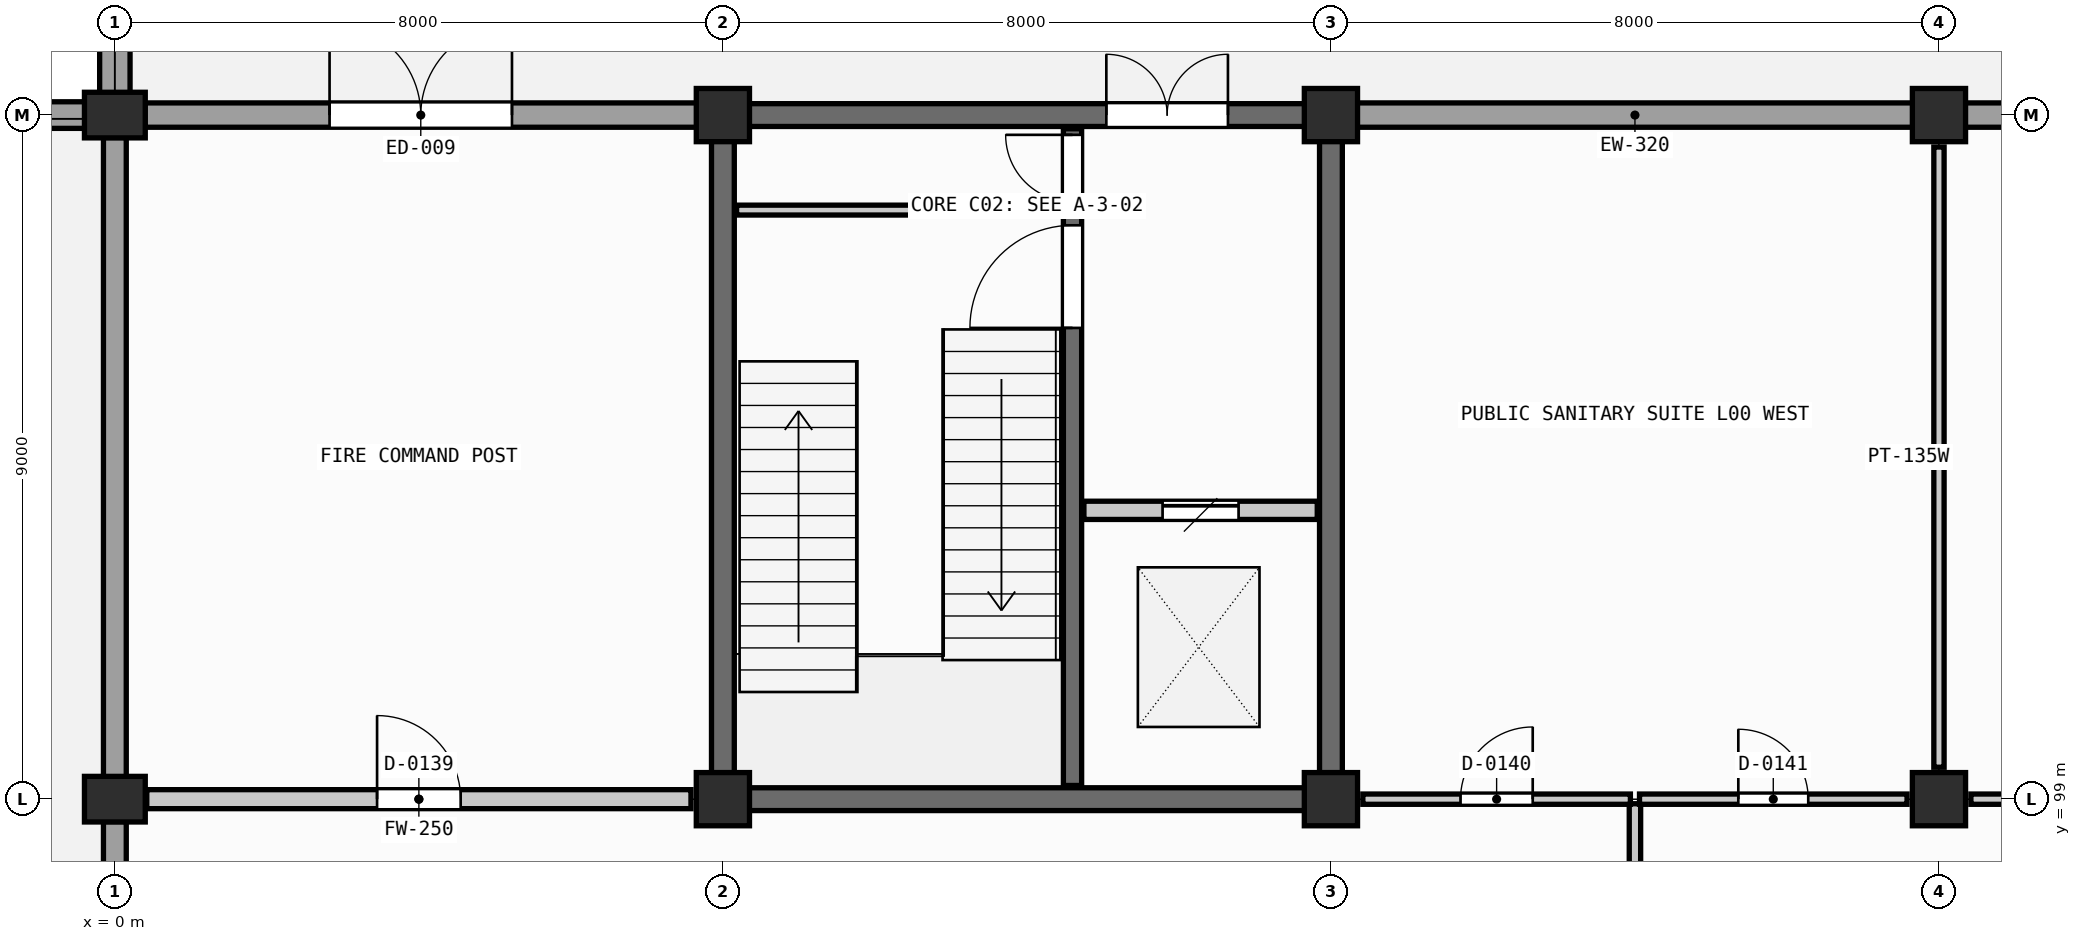
"""IFC4 building model, lengths in metres.
Left out: names, types, materials, properties, quantities, classifications, styles, units other than length and angle.
Written with IfcOpenShell. Run it as: python <this file> out.ifc"""

import sys

from ifc_helpers import new_model, si_unit, direction, frame, frame_2d, origin, origin_2d, place, context, subcontext, project, spatial, rectangle, extrude, element, fill, save


model = new_model("IFC4")
c1 = context("Model", 3, precision=1e-05, world=origin(), true_north=direction((0.0, 1.0)))
c2 = subcontext(c1, "Body", "Model", "MODEL_VIEW")
j1 = project(units=[si_unit("LENGTHUNIT", "METRE"), si_unit("PLANEANGLEUNIT", "RADIAN")], contexts=[c1])
p1 = place(None, origin())
s1 = spatial("IfcSite", under=j1, at=p1, CompositionType="ELEMENT")
p2 = place(p1, origin())
s2 = spatial("IfcBuilding", under=s1, at=p2, CompositionType="ELEMENT")
p3 = place(p2, origin())
s3 = spatial("IfcBuildingStorey", under=s2, at=p3, CompositionType="ELEMENT", Elevation=0.0)
p4 = place(p3, frame((-3.2, 108.0, -1.25), z_axis=(0.0, 0.0, 1.0), x_axis=(1.0, 0.0, 0.0)))
e1 = element("IfcWall", 1, at=p4, inside=s3, PredefinedType="STANDARD", context=c2, shape_type="SweptSolid", body=[
    extrude(rectangle(XDim=3.2, YDim=0.35, at=frame_2d((1.6, 0.0))), origin(), (0.0, 0.0, 1.0), 0.97),
])
p5 = place(p3, frame((0.0, 108.0, -1.25), z_axis=(0.0, 0.0, 1.0), x_axis=(0.0, 1.0, 0.0)))
e2 = element("IfcWall", 2, at=p5, inside=s3, PredefinedType="STANDARD", context=c2, shape_type="SweptSolid", body=[
    extrude(rectangle(XDim=9.0, YDim=0.4, at=frame_2d((4.5, 0.0))), origin(), (0.0, 0.0, 1.0), 0.97),
])
for number, where, z_axis, x_axis in (
    (3, (0.0, 99.0, -1.25), (0.0, 0.0, 1.0), (1.0, 0.0, 0.0)),
    (4, (0.0, 108.0, -1.25), (0.0, 0.0, 1.0), (1.0, 0.0, 0.0)),
):
    element("IfcColumn", number, at=place(p3, frame(where, z_axis=z_axis, x_axis=x_axis)), inside=s3, PredefinedType="COLUMN", context=c2, shape_type="SweptSolid", body=[
        extrude(rectangle(XDim=0.8, YDim=0.6, at=origin_2d()), origin(), (0.0, 0.0, 1.0), 6.05),
    ])
for number, where, z_axis, x_axis in (
    (5, (8.0, 99.0, -1.25), (0.0, 0.0, 1.0), (1.0, 0.0, 0.0)),
    (6, (8.0, 108.0, -1.25), (0.0, 0.0, 1.0), (1.0, 0.0, 0.0)),
    (7, (16.0, 99.0, -1.25), (0.0, 0.0, 1.0), (1.0, 0.0, 0.0)),
    (8, (16.0, 108.0, -1.25), (0.0, 0.0, 1.0), (1.0, 0.0, 0.0)),
    (9, (24.0, 99.0, -1.25), (0.0, 0.0, 1.0), (1.0, 0.0, 0.0)),
    (10, (24.0, 108.0, -1.25), (0.0, 0.0, 1.0), (1.0, 0.0, 0.0)),
):
    element("IfcColumn", number, at=place(p3, frame(where, z_axis=z_axis, x_axis=x_axis)), inside=s3, PredefinedType="COLUMN", context=c2, shape_type="SweptSolid", body=[
        extrude(rectangle(XDim=0.7, YDim=0.7, at=origin_2d()), origin(), (0.0, 0.0, 1.0), 6.05),
    ])
p6 = place(p3, frame((7.655, 108.0, 0.0), z_axis=(0.0, 0.0, 1.0), x_axis=(-1.0, 0.0, 0.0)))
e11 = element("IfcWall", 11, at=p6, inside=s3, PredefinedType="SOLIDWALL", context=c2, shape_type="SweptSolid", body=[
    extrude(rectangle(XDim=7.26, YDim=0.32, at=frame_2d((3.63, 0.0))), origin(), (0.0, 0.0, 1.0), 3.65),
])
p7 = place(p6, frame((2.43, 0.0, 0.0)))
e12 = element("IfcOpeningElement", 12, at=p7, cuts=e11, PredefinedType="OPENING", context=c2, shape_type="SweptSolid", body=[
    extrude(rectangle(XDim=2.4, YDim=2.3, at=frame_2d((1.2, 1.15))), frame((0.0, 0.17, 0.0), z_axis=(0.0, -1.0, 0.0), x_axis=(1.0, 0.0, 0.0)), (0.0, 0.0, 1.0), 0.34),
])
p8 = place(p3, frame((23.655, 108.0, 0.0), z_axis=(0.0, 0.0, 1.0), x_axis=(-1.0, 0.0, 0.0)))
e13 = element("IfcWall", 13, at=p8, inside=s3, PredefinedType="SOLIDWALL", context=c2, shape_type="SweptSolid", body=[
    extrude(rectangle(XDim=7.31, YDim=0.32, at=frame_2d((3.655, 0.0))), origin(), (0.0, 0.0, 1.0), 3.65),
])
p9 = place(p3, frame((31.63, 108.0, 0.0), z_axis=(0.0, 0.0, 1.0), x_axis=(-1.0, 0.0, 0.0)))
e14 = element("IfcWall", 14, at=p9, inside=s3, PredefinedType="SOLIDWALL", context=c2, shape_type="SweptSolid", body=[
    extrude(rectangle(XDim=7.285, YDim=0.32, at=frame_2d((3.643, 0.0))), origin(), (0.0, 0.0, 1.0), 3.65),
])
p10 = place(p3, frame((0.0, 98.705, 0.0), z_axis=(0.0, 0.0, 1.0), x_axis=(0.0, -1.0, 0.0)))
e15 = element("IfcWall", 15, at=p10, inside=s3, PredefinedType="SOLIDWALL", context=c2, shape_type="SweptSolid", body=[
    extrude(rectangle(XDim=8.41, YDim=0.3, at=frame_2d((4.205, 0.0))), origin(), (0.0, 0.0, 1.0), 3.65),
])
p11 = place(p10, frame((3.005, 0.0, 0.0)))
e16 = element("IfcOpeningElement", 16, at=p11, cuts=e15, PredefinedType="OPENING", context=c2, shape_type="SweptSolid", body=[
    extrude(rectangle(XDim=2.4, YDim=2.3, at=frame_2d((1.2, 1.15))), frame((0.0, 0.16, 0.0), z_axis=(0.0, -1.0, 0.0), x_axis=(1.0, 0.0, 0.0)), (0.0, 0.0, 1.0), 0.32),
])
p12 = place(p3, frame((0.0, 107.705, 0.0), z_axis=(0.0, 0.0, 1.0), x_axis=(0.0, -1.0, 0.0)))
e17 = element("IfcWall", 17, at=p12, inside=s3, PredefinedType="SOLIDWALL", context=c2, shape_type="SweptSolid", body=[
    extrude(rectangle(XDim=8.41, YDim=0.3, at=frame_2d((4.205, 0.0))), origin(), (0.0, 0.0, 1.0), 3.65),
])
p13 = place(p3, frame((8.345, 99.0, -1.25), z_axis=(0.0, 0.0, 1.0), x_axis=(1.0, 0.0, 0.0)))
e18 = element("IfcWall", 18, at=p13, inside=s3, PredefinedType="SHEAR", context=c2, shape_type="SweptSolid", body=[
    extrude(rectangle(XDim=7.31, YDim=0.3, at=frame_2d((3.655, 0.0))), origin(), (0.0, 0.0, 1.0), 5.805),
])
p14 = place(p3, frame((8.345, 108.0, -1.25), z_axis=(0.0, 0.0, 1.0), x_axis=(1.0, 0.0, 0.0)))
e19 = element("IfcWall", 19, at=p14, inside=s3, PredefinedType="SHEAR", context=c2, shape_type="SweptSolid", body=[
    extrude(rectangle(XDim=7.31, YDim=0.3, at=frame_2d((3.655, 0.0))), origin(), (0.0, 0.0, 1.0), 5.805),
])
p15 = place(p14, frame((4.7, 0.0, 1.25)))
e20 = element("IfcOpeningElement", 20, at=p15, cuts=e19, PredefinedType="OPENING", context=c2, shape_type="SweptSolid", body=[
    extrude(rectangle(XDim=1.6, YDim=2.2, at=frame_2d((0.8, 1.1))), frame((0.0, 0.16, 0.0), z_axis=(0.0, -1.0, 0.0), x_axis=(1.0, 0.0, 0.0)), (0.0, 0.0, 1.0), 0.32),
])
for number, where, z_axis, x_axis in (
    (21, (8.0, 99.345, -1.25), (0.0, 0.0, 1.0), (0.0, 1.0, 0.0)),
    (22, (16.0, 99.345, -1.25), (0.0, 0.0, 1.0), (0.0, 1.0, 0.0)),
):
    element("IfcWall", number, at=place(p3, frame(where, z_axis=z_axis, x_axis=x_axis)), inside=s3, PredefinedType="SHEAR", context=c2, shape_type="SweptSolid", body=[
        extrude(rectangle(XDim=8.31, YDim=0.3, at=frame_2d((4.155, 0.0))), origin(), (0.0, 0.0, 1.0), 5.805),
    ])
p16 = place(p3, frame((12.6, 99.18, -1.25), z_axis=(0.0, 0.0, 1.0), x_axis=(0.0, 1.0, 0.0)))
e23 = element("IfcWall", 23, at=p16, inside=s3, PredefinedType="SHEAR", context=c2, shape_type="SweptSolid", body=[
    extrude(rectangle(XDim=8.64, YDim=0.24, at=frame_2d((4.32, 0.0))), origin(), (0.0, 0.0, 1.0), 5.805),
])
p17 = place(p16, frame((6.02, 0.0, 1.25)))
e24 = element("IfcOpeningElement", 24, at=p17, cuts=e23, PredefinedType="OPENING", context=c2, shape_type="SweptSolid", body=[
    extrude(rectangle(XDim=1.35, YDim=2.2, at=frame_2d((0.675, 1.1))), frame((0.0, 0.13, 0.0), z_axis=(0.0, -1.0, 0.0), x_axis=(1.0, 0.0, 0.0)), (0.0, 0.0, 1.0), 0.26),
])
p18 = place(p16, frame((7.68, 0.0, 1.25)))
e25 = element("IfcOpeningElement", 25, at=p18, cuts=e23, PredefinedType="OPENING", context=c2, shape_type="SweptSolid", body=[
    extrude(rectangle(XDim=0.88, YDim=2.02, at=frame_2d((0.44, 1.01))), frame((0.0, 0.13, 0.0), z_axis=(0.0, -1.0, 0.0), x_axis=(1.0, 0.0, 0.0)), (0.0, 0.0, 1.0), 0.26),
])
p19 = place(p3, frame((8.18, 106.75, 0.0), z_axis=(0.0, 0.0, 1.0), x_axis=(1.0, 0.0, 0.0)))
e26 = element("IfcWall", 26, at=p19, inside=s3, PredefinedType="PARTITIONING", context=c2, shape_type="SweptSolid", body=[
    extrude(rectangle(XDim=4.28, YDim=0.13, at=frame_2d((2.14, 0.0))), origin(), (0.0, 0.0, 1.0), 3.905),
])
p20 = place(p3, frame((12.75, 102.8, 0.0), z_axis=(0.0, 0.0, 1.0), x_axis=(1.0, 0.0, 0.0)))
e27 = element("IfcWall", 27, at=p20, inside=s3, PredefinedType="SHEAR", context=c2, shape_type="SweptSolid", body=[
    extrude(rectangle(XDim=3.07, YDim=0.24, at=frame_2d((1.535, 0.0))), origin(), (0.0, 0.0, 1.0), 3.905),
])
p21 = place(p20, frame((1.035, 0.0, 0.0)))
e28 = element("IfcOpeningElement", 28, at=p21, cuts=e27, PredefinedType="OPENING", context=c2, shape_type="SweptSolid", body=[
    extrude(rectangle(XDim=1.0, YDim=2.15, at=frame_2d((0.5, 1.075))), frame((0.0, 0.13, 0.0), z_axis=(0.0, -1.0, 0.0), x_axis=(1.0, 0.0, 0.0)), (0.0, 0.0, 1.0), 0.26),
])
p22 = place(p3, frame((20.0, 90.06, 0.0), z_axis=(0.0, 0.0, 1.0), x_axis=(0.0, 1.0, 0.0)))
e29 = element("IfcWall", 29, at=p22, inside=s3, PredefinedType="PARTITIONING", context=c2, shape_type="SweptSolid", body=[
    extrude(rectangle(XDim=8.88, YDim=0.15, at=frame_2d((4.44, 0.0))), origin(), (0.0, 0.0, 1.0), 3.65),
])
p23 = place(p3, frame((0.42, 99.0, 0.0), z_axis=(0.0, 0.0, 1.0), x_axis=(1.0, 0.0, 0.0)))
e30 = element("IfcWall", 30, at=p23, inside=s3, PredefinedType="SOLIDWALL", context=c2, shape_type="SweptSolid", body=[
    extrude(rectangle(XDim=7.16, YDim=0.25, at=frame_2d((3.58, 0.0))), origin(), (0.0, 0.0, 1.0), 3.65),
])
p24 = place(p23, frame((3.03, 0.0, 0.0)))
e31 = element("IfcOpeningElement", 31, at=p24, cuts=e30, PredefinedType="OPENING", context=c2, shape_type="SweptSolid", body=[
    extrude(rectangle(XDim=1.1, YDim=2.22, at=frame_2d((0.55, 1.11))), frame((0.0, 0.135, 0.0), z_axis=(0.0, -1.0, 0.0), x_axis=(1.0, 0.0, 0.0)), (0.0, 0.0, 1.0), 0.27),
])
p25 = place(p3, frame((16.42, 99.0, 0.0), z_axis=(0.0, 0.0, 1.0), x_axis=(1.0, 0.0, 0.0)))
e32 = element("IfcWall", 32, at=p25, inside=s3, PredefinedType="PLUMBINGWALL", context=c2, shape_type="SweptSolid", body=[
    extrude(rectangle(XDim=3.52, YDim=0.135, at=frame_2d((1.76, 0.0))), origin(), (0.0, 0.0, 1.0), 3.65),
])
p26 = place(p25, frame((1.285, 0.0, 0.0)))
e33 = element("IfcOpeningElement", 33, at=p26, cuts=e32, PredefinedType="OPENING", context=c2, shape_type="SweptSolid", body=[
    extrude(rectangle(XDim=0.95, YDim=2.1, at=frame_2d((0.475, 1.05))), frame((0.0, 0.078, 0.0), z_axis=(0.0, -1.0, 0.0), x_axis=(1.0, 0.0, 0.0)), (0.0, 0.0, 1.0), 0.155),
])
p27 = place(p3, frame((20.06, 99.0, 0.0), z_axis=(0.0, 0.0, 1.0), x_axis=(1.0, 0.0, 0.0)))
e34 = element("IfcWall", 34, at=p27, inside=s3, PredefinedType="PLUMBINGWALL", context=c2, shape_type="SweptSolid", body=[
    extrude(rectangle(XDim=3.52, YDim=0.135, at=frame_2d((1.76, 0.0))), origin(), (0.0, 0.0, 1.0), 3.65),
])
p28 = place(p27, frame((1.3, 0.0, 0.0)))
e35 = element("IfcOpeningElement", 35, at=p28, cuts=e34, PredefinedType="OPENING", context=c2, shape_type="SweptSolid", body=[
    extrude(rectangle(XDim=0.92, YDim=2.08, at=frame_2d((0.46, 1.04))), frame((0.0, 0.078, 0.0), z_axis=(0.0, -1.0, 0.0), x_axis=(1.0, 0.0, 0.0)), (0.0, 0.0, 1.0), 0.155),
])
p29 = place(p3, frame((24.42, 99.0, 0.0), z_axis=(0.0, 0.0, 1.0), x_axis=(1.0, 0.0, 0.0)))
e36 = element("IfcWall", 36, at=p29, inside=s3, PredefinedType="PLUMBINGWALL", context=c2, shape_type="SweptSolid", body=[
    extrude(rectangle(XDim=7.16, YDim=0.135, at=frame_2d((3.58, 0.0))), origin(), (0.0, 0.0, 1.0), 3.65),
])
p30 = place(p29, frame((3.04, 0.0, 0.0)))
e37 = element("IfcOpeningElement", 37, at=p30, cuts=e36, PredefinedType="OPENING", context=c2, shape_type="SweptSolid", body=[
    extrude(rectangle(XDim=1.08, YDim=2.12, at=frame_2d((0.54, 1.06))), frame((0.0, 0.078, 0.0), z_axis=(0.0, -1.0, 0.0), x_axis=(1.0, 0.0, 0.0)), (0.0, 0.0, 1.0), 0.155),
])
p31 = place(p3, frame((24.0, 99.42, 0.0), z_axis=(0.0, 0.0, 1.0), x_axis=(0.0, 1.0, 0.0)))
e38 = element("IfcWall", 38, at=p31, inside=s3, PredefinedType="PLUMBINGWALL", context=c2, shape_type="SweptSolid", body=[
    extrude(rectangle(XDim=8.16, YDim=0.135, at=frame_2d((4.08, 0.0))), origin(), (0.0, 0.0, 1.0), 3.65),
])
p32 = place(p7, frame((2.4, 0.0, 0.0), z_axis=(0.0, 0.0, 1.0), x_axis=(-1.0, 0.0, 0.0)))
e39 = element("IfcDoor", 39, at=p32, inside=s3, OperationType="DOUBLE_DOOR_SINGLE_SWING", PredefinedType="DOOR", context=c2, shape_type="SweptSolid", body=[
    extrude(rectangle(XDim=2.4, YDim=2.3, at=frame_2d((1.2, 1.15))), frame((0.0, 0.025, 0.0), z_axis=(0.0, -1.0, 0.0), x_axis=(1.0, 0.0, 0.0)), (0.0, 0.0, 1.0), 0.05),
])
fill(e12, e39)
p33 = place(p17, origin())
e40 = element("IfcDoor", 40, at=p33, inside=s3, OperationType="SINGLE_SWING_LEFT", PredefinedType="DOOR", context=c2, shape_type="SweptSolid", body=[
    extrude(rectangle(XDim=1.35, YDim=2.2, at=frame_2d((0.675, 1.1))), frame((0.0, 0.025, 0.0), z_axis=(0.0, -1.0, 0.0), x_axis=(1.0, 0.0, 0.0)), (0.0, 0.0, 1.0), 0.05),
])
fill(e24, e40)
p34 = place(p18, origin())
e41 = element("IfcDoor", 41, at=p34, inside=s3, OperationType="SINGLE_SWING_RIGHT", PredefinedType="DOOR", context=c2, shape_type="SweptSolid", body=[
    extrude(rectangle(XDim=0.88, YDim=2.02, at=frame_2d((0.44, 1.01))), frame((0.0, 0.025, 0.0), z_axis=(0.0, -1.0, 0.0), x_axis=(1.0, 0.0, 0.0)), (0.0, 0.0, 1.0), 0.05),
])
fill(e25, e41)
p35 = place(p15, origin())
e42 = element("IfcDoor", 42, at=p35, inside=s3, OperationType="DOUBLE_DOOR_SINGLE_SWING", PredefinedType="DOOR", context=c2, shape_type="SweptSolid", body=[
    extrude(rectangle(XDim=1.6, YDim=2.2, at=frame_2d((0.8, 1.1))), frame((0.0, 0.025, 0.0), z_axis=(0.0, -1.0, 0.0), x_axis=(1.0, 0.0, 0.0)), (0.0, 0.0, 1.0), 0.05),
])
fill(e20, e42)
p36 = place(p21, origin())
e43 = element("IfcDoor", 43, at=p36, inside=s3, OperationType="SLIDING_TO_LEFT", PredefinedType="DOOR", context=c2, shape_type="SweptSolid", body=[
    extrude(rectangle(XDim=1.0, YDim=2.15, at=frame_2d((0.5, 1.075))), frame((0.0, 0.025, 0.0), z_axis=(0.0, -1.0, 0.0), x_axis=(1.0, 0.0, 0.0)), (0.0, 0.0, 1.0), 0.05),
])
fill(e28, e43)
p37 = place(p24, origin())
e44 = element("IfcDoor", 44, at=p37, inside=s3, OperationType="SINGLE_SWING_LEFT", PredefinedType="DOOR", context=c2, shape_type="SweptSolid", body=[
    extrude(rectangle(XDim=1.1, YDim=2.22, at=frame_2d((0.55, 1.11))), frame((0.0, 0.025, 0.0), z_axis=(0.0, -1.0, 0.0), x_axis=(1.0, 0.0, 0.0)), (0.0, 0.0, 1.0), 0.05),
])
fill(e31, e44)
p38 = place(p26, origin())
e45 = element("IfcDoor", 45, at=p38, inside=s3, OperationType="SINGLE_SWING_RIGHT", PredefinedType="DOOR", context=c2, shape_type="SweptSolid", body=[
    extrude(rectangle(XDim=0.95, YDim=2.1, at=frame_2d((0.475, 1.05))), frame((0.0, 0.025, 0.0), z_axis=(0.0, -1.0, 0.0), x_axis=(1.0, 0.0, 0.0)), (0.0, 0.0, 1.0), 0.05),
])
fill(e33, e45)
p39 = place(p28, origin())
e46 = element("IfcDoor", 46, at=p39, inside=s3, OperationType="SINGLE_SWING_LEFT", PredefinedType="DOOR", context=c2, shape_type="SweptSolid", body=[
    extrude(rectangle(XDim=0.92, YDim=2.08, at=frame_2d((0.46, 1.04))), frame((0.0, 0.025, 0.0), z_axis=(0.0, -1.0, 0.0), x_axis=(1.0, 0.0, 0.0)), (0.0, 0.0, 1.0), 0.05),
])
fill(e35, e46)
save(model, sys.argv[1])
